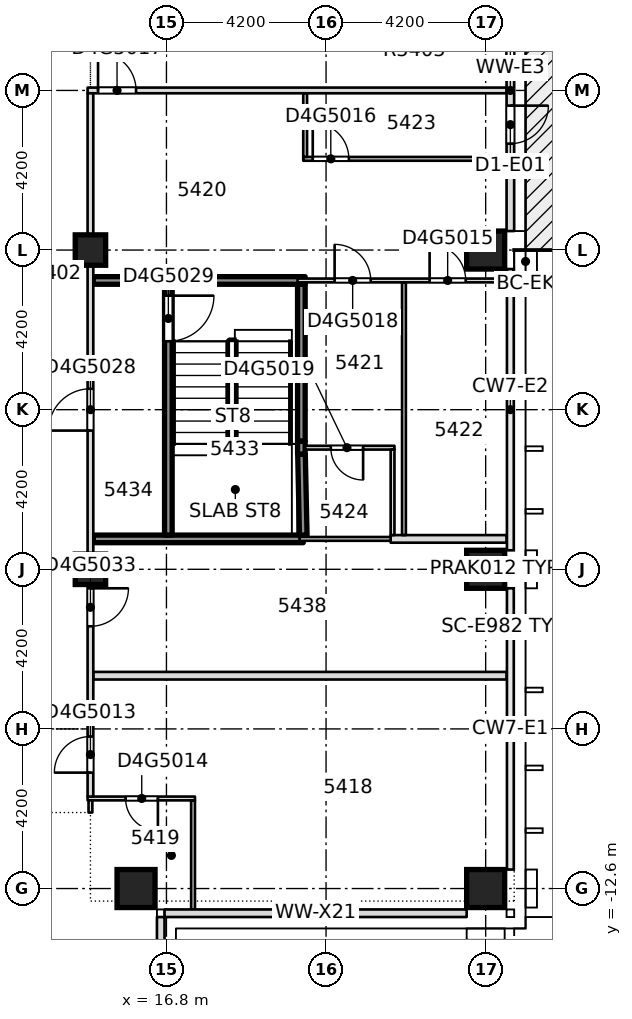
"""IFC4 building model, lengths in metres.
Left out: names, types, materials, properties, quantities, classifications, styles, units other than length and angle.
Written with IfcOpenShell. Run it as: python <this file> out.ifc"""

import sys

from ifc_helpers import new_model, si_unit, direction, frame, frame_2d, origin, origin_2d, place, context, subcontext, project, spatial, rectangle, extrude, element, fill, save


model = new_model("IFC4")
c1 = context("Model", 3, precision=1e-05, world=origin(), true_north=direction((0.0, 1.0)))
c2 = subcontext(c1, "Body", "Model", "MODEL_VIEW")
j1 = project(units=[si_unit("LENGTHUNIT", "METRE"), si_unit("PLANEANGLEUNIT", "RADIAN")], contexts=[c1])
p1 = place(None, origin())
s1 = spatial("IfcSite", under=j1, at=p1, CompositionType="ELEMENT")
p2 = place(p1, origin())
s2 = spatial("IfcBuilding", under=s1, at=p2, CompositionType="ELEMENT")
p3 = place(p2, frame((0.0, 0.0, 206.6)))
s3 = spatial("IfcBuildingStorey", under=s2, at=p3, CompositionType="ELEMENT", Elevation=206.6)
for number, where, z_axis, x_axis in (
    (1, (16.0, -12.6, -0.4), (0.0, 0.0, 1.0), (1.0, 0.0, 0.0)),
    (2, (25.2, -12.6, -0.4), (0.0, 0.0, 1.0), (1.0, 0.0, 0.0)),
    (3, (25.2, -4.2, -0.4), (0.0, 0.0, 1.0), (1.0, 0.0, 0.0)),
    (4, (25.2, 4.2, -0.4), (0.0, 0.0, 1.0), (1.0, 0.0, 0.0)),
):
    element("IfcColumn", number, at=place(p3, frame(where, z_axis=z_axis, x_axis=x_axis)), inside=s3, PredefinedType="COLUMN", context=c2, shape_type="SweptSolid", body=[
        extrude(rectangle(XDim=1.0, YDim=1.0, at=origin_2d()), origin(), (0.0, 0.0, 1.0), 3.45),
    ])
for number, where, z_axis, x_axis in (
    (5, (14.8, -4.2, -0.4), (0.0, 0.0, 1.0), (1.0, 0.0, 0.0)),
    (6, (14.8, 4.2, -0.4), (0.0, 0.0, 1.0), (1.0, 0.0, 0.0)),
):
    element("IfcColumn", number, at=place(p3, frame(where, z_axis=z_axis, x_axis=x_axis)), inside=s3, PredefinedType="COLUMN", context=c2, shape_type="SweptSolid", body=[
        extrude(rectangle(XDim=0.8, YDim=0.8, at=origin_2d()), origin(), (0.0, 0.0, 1.0), 3.45),
    ])
p4 = place(p3, frame((14.725, -10.23, 0.0), z_axis=(0.0, 0.0, 1.0), x_axis=(1.0, 0.0, 0.0)))
e7 = element("IfcWall", 7, at=p4, inside=s3, PredefinedType="PARTITIONING", context=c2, shape_type="SweptSolid", body=[
    extrude(rectangle(XDim=2.825, YDim=0.1, at=frame_2d((1.413, 0.0))), origin(), (0.0, 0.0, 1.0), 3.05),
])
p5 = place(p4, frame((1.0, 0.0, 0.0)))
e8 = element("IfcOpeningElement", 8, at=p5, cuts=e7, PredefinedType="OPENING", context=c2, shape_type="SweptSolid", body=[
    extrude(rectangle(XDim=0.85, YDim=2.1, at=frame_2d((0.425, 1.05))), frame((0.0, 0.06, 0.0), z_axis=(0.0, -1.0, 0.0), x_axis=(1.0, 0.0, 0.0)), (0.0, 0.0, 1.0), 0.12),
])
p6 = place(p3, frame((14.875, -7.0, 0.0), z_axis=(0.0, 0.0, 1.0), x_axis=(1.0, 0.0, 0.0)))
e9 = element("IfcWall", 9, at=p6, inside=s3, PredefinedType="PARTITIONING", context=c2, shape_type="SweptSolid", body=[
    extrude(rectangle(XDim=10.875, YDim=0.2, at=frame_2d((5.438, 0.0))), origin(), (0.0, 0.0, 1.0), 3.05),
])
p7 = place(p3, frame((14.875, -3.4, 0.0), z_axis=(0.0, 0.0, 1.0), x_axis=(1.0, 0.0, 0.0)))
e10 = element("IfcWall", 10, at=p7, inside=s3, PredefinedType="SOLIDWALL", context=c2, shape_type="SweptSolid", body=[
    extrude(rectangle(XDim=5.525, YDim=0.2, at=frame_2d((2.762, 0.0))), origin(), (0.0, 0.0, 1.0), 3.05),
])
p8 = place(p3, frame((20.3, -3.4, 0.0), z_axis=(0.0, 0.0, 1.0), x_axis=(1.0, 0.0, 0.0)))
e11 = element("IfcWall", 11, at=p8, inside=s3, PredefinedType="PARTITIONING", context=c2, shape_type="SweptSolid", body=[
    extrude(rectangle(XDim=2.5, YDim=0.1, at=frame_2d((1.25, 0.0))), origin(), (0.0, 0.0, 1.0), 3.05),
])
p9 = place(p3, frame((22.7, -3.4, 0.0), z_axis=(0.0, 0.0, 1.0), x_axis=(1.0, 0.0, 0.0)))
e12 = element("IfcWall", 12, at=p9, inside=s3, PredefinedType="PARTITIONING", context=c2, shape_type="SweptSolid", body=[
    extrude(rectangle(XDim=3.05, YDim=0.2, at=frame_2d((1.525, 0.0))), origin(), (0.0, 0.0, 1.0), 3.05),
])
p10 = place(p3, frame((20.45, -1.0, 0.0), z_axis=(0.0, 0.0, 1.0), x_axis=(1.0, 0.0, 0.0)))
e13 = element("IfcWall", 13, at=p10, inside=s3, PredefinedType="PARTITIONING", context=c2, shape_type="SweptSolid", body=[
    extrude(rectangle(XDim=2.35, YDim=0.1, at=frame_2d((1.175, 0.0))), origin(), (0.0, 0.0, 1.0), 3.05),
])
p11 = place(p10, frame((0.675, 0.0, 0.0)))
e14 = element("IfcOpeningElement", 14, at=p11, cuts=e13, PredefinedType="OPENING", context=c2, shape_type="SweptSolid", body=[
    extrude(rectangle(XDim=0.85, YDim=2.1, at=frame_2d((0.425, 1.05))), frame((0.0, 0.06, 0.0), z_axis=(0.0, -1.0, 0.0), x_axis=(1.0, 0.0, 0.0)), (0.0, 0.0, 1.0), 0.12),
])
p12 = place(p3, frame((20.25, 3.4, 0.0), z_axis=(0.0, 0.0, 1.0), x_axis=(1.0, 0.0, 0.0)))
e15 = element("IfcWall", 15, at=p12, inside=s3, PredefinedType="PARTITIONING", context=c2, shape_type="SweptSolid", body=[
    extrude(rectangle(XDim=5.5, YDim=0.1, at=frame_2d((2.75, 0.0))), origin(), (0.0, 0.0, 1.0), 3.05),
])
p13 = place(p12, frame((3.475, 0.0, 0.0)))
e16 = element("IfcOpeningElement", 16, at=p13, cuts=e15, PredefinedType="OPENING", context=c2, shape_type="SweptSolid", body=[
    extrude(rectangle(XDim=0.95, YDim=2.1, at=frame_2d((0.475, 1.05))), frame((0.0, 0.06, 0.0), z_axis=(0.0, -1.0, 0.0), x_axis=(1.0, 0.0, 0.0)), (0.0, 0.0, 1.0), 0.12),
])
p14 = place(p12, frame((0.975, 0.0, 0.0)))
e17 = element("IfcOpeningElement", 17, at=p14, cuts=e15, PredefinedType="OPENING", context=c2, shape_type="SweptSolid", body=[
    extrude(rectangle(XDim=0.95, YDim=2.1, at=frame_2d((0.475, 1.05))), frame((0.0, 0.06, 0.0), z_axis=(0.0, -1.0, 0.0), x_axis=(1.0, 0.0, 0.0)), (0.0, 0.0, 1.0), 0.12),
])
p15 = place(p3, frame((20.4, 6.6, 0.0), z_axis=(0.0, 0.0, 1.0), x_axis=(1.0, 0.0, 0.0)))
e18 = element("IfcWall", 18, at=p15, inside=s3, PredefinedType="PARTITIONING", context=c2, shape_type="SweptSolid", body=[
    extrude(rectangle(XDim=5.35, YDim=0.1, at=frame_2d((2.675, 0.0))), origin(), (0.0, 0.0, 1.0), 3.05),
])
p16 = place(p15, frame((0.25, 0.0, 0.0)))
e19 = element("IfcOpeningElement", 19, at=p16, cuts=e18, PredefinedType="OPENING", context=c2, shape_type="SweptSolid", body=[
    extrude(rectangle(XDim=0.95, YDim=2.1, at=frame_2d((0.475, 1.05))), frame((0.0, 0.06, 0.0), z_axis=(0.0, -1.0, 0.0), x_axis=(1.0, 0.0, 0.0)), (0.0, 0.0, 1.0), 0.12),
])
p17 = place(p3, frame((14.725, 8.4, 0.0), z_axis=(0.0, 0.0, 1.0), x_axis=(1.0, 0.0, 0.0)))
e20 = element("IfcWall", 20, at=p17, inside=s3, PredefinedType="PARTITIONING", context=c2, shape_type="SweptSolid", body=[
    extrude(rectangle(XDim=11.025, YDim=0.15, at=frame_2d((5.512, 0.0))), origin(), (0.0, 0.0, 1.0), 3.05),
])
p18 = place(p17, frame((0.275, 0.0, 0.0)))
e21 = element("IfcOpeningElement", 21, at=p18, cuts=e20, PredefinedType="OPENING", context=c2, shape_type="SweptSolid", body=[
    extrude(rectangle(XDim=1.0, YDim=2.1, at=frame_2d((0.5, 1.05))), frame((0.0, 0.085, 0.0), z_axis=(0.0, -1.0, 0.0), x_axis=(1.0, 0.0, 0.0)), (0.0, 0.0, 1.0), 0.17),
])
p19 = place(p3, frame((14.8, -10.6, 0.0), z_axis=(0.0, 0.0, 1.0), x_axis=(0.0, 1.0, 0.0)))
e22 = element("IfcWall", 22, at=p19, inside=s3, PredefinedType="PARTITIONING", context=c2, shape_type="SweptSolid", body=[
    extrude(rectangle(XDim=0.32, YDim=0.1, at=frame_2d((0.16, 0.0))), origin(), (0.0, 0.0, 1.0), 3.05),
])
p20 = place(p3, frame((14.8, -10.18, 0.0), z_axis=(0.0, 0.0, 1.0), x_axis=(0.0, 1.0, 0.0)))
e23 = element("IfcWall", 23, at=p20, inside=s3, PredefinedType="PARTITIONING", context=c2, shape_type="SweptSolid", body=[
    extrude(rectangle(XDim=18.505, YDim=0.15, at=frame_2d((9.252, 0.0))), origin(), (0.0, 0.0, 1.0), 3.05),
])
p21 = place(p20, frame((0.63, 0.0, 0.0)))
e24 = element("IfcOpeningElement", 24, at=p21, cuts=e23, PredefinedType="OPENING", context=c2, shape_type="SweptSolid", body=[
    extrude(rectangle(XDim=0.95, YDim=2.1, at=frame_2d((0.475, 1.05))), frame((0.0, 0.085, 0.0), z_axis=(0.0, -1.0, 0.0), x_axis=(1.0, 0.0, 0.0)), (0.0, 0.0, 1.0), 0.17),
])
p22 = place(p20, frame((9.63, 0.0, 0.0)))
e25 = element("IfcOpeningElement", 25, at=p22, cuts=e23, PredefinedType="OPENING", context=c2, shape_type="SweptSolid", body=[
    extrude(rectangle(XDim=1.1, YDim=2.1, at=frame_2d((0.55, 1.05))), frame((0.0, 0.085, 0.0), z_axis=(0.0, -1.0, 0.0), x_axis=(1.0, 0.0, 0.0)), (0.0, 0.0, 1.0), 0.17),
])
p23 = place(p20, frame((4.48, 0.0, 0.0)))
e26 = element("IfcOpeningElement", 26, at=p23, cuts=e23, PredefinedType="OPENING", context=c2, shape_type="SweptSolid", body=[
    extrude(rectangle(XDim=1.0, YDim=2.1, at=frame_2d((0.5, 1.05))), frame((0.0, 0.085, 0.0), z_axis=(0.0, -1.0, 0.0), x_axis=(1.0, 0.0, 0.0)), (0.0, 0.0, 1.0), 0.17),
])
p24 = place(p3, frame((16.85, -3.3, 0.0), z_axis=(0.0, 0.0, 1.0), x_axis=(0.0, 1.0, 0.0)))
e27 = element("IfcWall", 27, at=p24, inside=s3, PredefinedType="SOLIDWALL", context=c2, shape_type="SweptSolid", body=[
    extrude(rectangle(XDim=6.6, YDim=0.2, at=frame_2d((3.3, 0.0))), origin(), (0.0, 0.0, 1.0), 3.05),
])
p25 = place(p24, frame((5.1, 0.0, 0.0)))
e28 = element("IfcOpeningElement", 28, at=p25, cuts=e27, PredefinedType="OPENING", context=c2, shape_type="SweptSolid", body=[
    extrude(rectangle(XDim=1.2, YDim=2.1, at=frame_2d((0.6, 1.05))), frame((0.0, 0.11, 0.0), z_axis=(0.0, -1.0, 0.0), x_axis=(1.0, 0.0, 0.0)), (0.0, 0.0, 1.0), 0.22),
])
p26 = place(p3, frame((17.5, -13.15, 0.0), z_axis=(0.0, 0.0, 1.0), x_axis=(0.0, 1.0, 0.0)))
e29 = element("IfcWall", 29, at=p26, inside=s3, PredefinedType="PARTITIONING", context=c2, shape_type="SweptSolid", body=[
    extrude(rectangle(XDim=2.87, YDim=0.1, at=frame_2d((1.435, 0.0))), origin(), (0.0, 0.0, 1.0), 3.05),
])
p27 = place(p3, frame((20.4, -3.3, 0.0), z_axis=(0.0, 0.0, 1.0), x_axis=(-0.021771342749, 0.999762976227, 0.0)))
e30 = element("IfcWall", 30, at=p27, inside=s3, PredefinedType="SOLIDWALL", context=c2, shape_type="SweptSolid", body=[
    extrude(rectangle(XDim=2.131, YDim=0.2, at=frame_2d((1.065, 0.0))), origin(), (0.0, 0.0, 1.0), 3.05),
])
p28 = place(p3, frame((20.35, -0.83, 0.0), z_axis=(0.0, 0.0, 1.0), x_axis=(0.0, 1.0, 0.0)))
e31 = element("IfcWall", 31, at=p28, inside=s3, PredefinedType="SOLIDWALL", context=c2, shape_type="SweptSolid", body=[
    extrude(rectangle(XDim=4.13, YDim=0.2, at=frame_2d((2.065, 0.0))), origin(), (0.0, 0.0, 1.0), 3.05),
])
p29 = place(p3, frame((20.45, 6.65, 0.0), z_axis=(0.0, 0.0, 1.0), x_axis=(0.0, 1.0, 0.0)))
e32 = element("IfcWall", 32, at=p29, inside=s3, PredefinedType="PARTITIONING", context=c2, shape_type="SweptSolid", body=[
    extrude(rectangle(XDim=1.675, YDim=0.1, at=frame_2d((0.837, 0.0))), origin(), (0.0, 0.0, 1.0), 3.05),
])
p30 = place(p3, frame((22.75, -3.3, 0.0), z_axis=(0.0, 0.0, 1.0), x_axis=(0.0, 1.0, 0.0)))
e33 = element("IfcWall", 33, at=p30, inside=s3, PredefinedType="PARTITIONING", context=c2, shape_type="SweptSolid", body=[
    extrude(rectangle(XDim=2.25, YDim=0.1, at=frame_2d((1.125, 0.0))), origin(), (0.0, 0.0, 1.0), 3.05),
])
p31 = place(p3, frame((23.05, -3.3, 0.0), z_axis=(0.0, 0.0, 1.0), x_axis=(0.0, 1.0, 0.0)))
e34 = element("IfcWall", 34, at=p31, inside=s3, PredefinedType="PARTITIONING", context=c2, shape_type="SweptSolid", body=[
    extrude(rectangle(XDim=6.65, YDim=0.1, at=frame_2d((3.325, 0.0))), origin(), (0.0, 0.0, 1.0), 3.05),
])
p32 = place(p3, frame((16.65, -20.5, 0.0), z_axis=(0.0, 0.0, 1.0), x_axis=(0.0, 1.0, 0.0)))
e35 = element("IfcWall", 35, at=p32, inside=s3, PredefinedType="STANDARD", context=c2, shape_type="SweptSolid", body=[
    extrude(rectangle(XDim=7.15, YDim=0.2, at=frame_2d((3.575, 0.0))), origin(), (0.0, 0.0, 1.0), 3.05),
])
p33 = place(p32, frame((0.4, 0.0, 0.2)))
e36 = element("IfcOpeningElement", 36, at=p33, cuts=e35, PredefinedType="OPENING", context=c2, shape_type="SweptSolid", body=[
    extrude(rectangle(XDim=1.8, YDim=2.65, at=frame_2d((0.9, 1.325))), frame((0.0, 0.11, 0.0), z_axis=(0.0, -1.0, 0.0), x_axis=(1.0, 0.0, 0.0)), (0.0, 0.0, 1.0), 0.22),
])
p34 = place(p32, frame((3.975, 0.0, 0.2)))
e37 = element("IfcOpeningElement", 37, at=p34, cuts=e35, PredefinedType="OPENING", context=c2, shape_type="SweptSolid", body=[
    extrude(rectangle(XDim=1.8, YDim=2.65, at=frame_2d((0.9, 1.325))), frame((0.0, 0.11, 0.0), z_axis=(0.0, -1.0, 0.0), x_axis=(1.0, 0.0, 0.0)), (0.0, 0.0, 1.0), 0.22),
])
p35 = place(p3, frame((16.75, -13.25, 0.0), z_axis=(0.0, 0.0, 1.0), x_axis=(1.0, 0.0, 0.0)))
e38 = element("IfcWall", 38, at=p35, inside=s3, PredefinedType="STANDARD", context=c2, shape_type="SweptSolid", body=[
    extrude(rectangle(XDim=7.95, YDim=0.2, at=frame_2d((3.975, 0.0))), origin(), (0.0, 0.0, 1.0), 3.05),
])
p36 = place(p3, frame((25.85, 4.7, 0.0), z_axis=(0.0, 0.0, 1.0), x_axis=(0.0, 1.0, 0.0)))
e39 = element("IfcWall", 39, at=p36, inside=s3, PredefinedType="STANDARD", context=c2, shape_type="SweptSolid", body=[
    extrude(rectangle(XDim=7.4, YDim=0.2, at=frame_2d((3.7, 0.0))), origin(), (0.0, 0.0, 1.0), 3.05),
])
p37 = place(p36, frame((2.3, 0.0, 0.0)))
e40 = element("IfcOpeningElement", 40, at=p37, cuts=e39, PredefinedType="OPENING", context=c2, shape_type="SweptSolid", body=[
    extrude(rectangle(XDim=1.0, YDim=2.4, at=frame_2d((0.5, 1.2))), frame((0.0, 0.11, 0.0), z_axis=(0.0, -1.0, 0.0), x_axis=(1.0, 0.0, 0.0)), (0.0, 0.0, 1.0), 0.22),
])
p38 = place(p36, frame((4.1, 0.0, 0.2)))
e41 = element("IfcOpeningElement", 41, at=p38, cuts=e39, PredefinedType="OPENING", context=c2, shape_type="SweptSolid", body=[
    extrude(rectangle(XDim=1.8, YDim=2.65, at=frame_2d((0.9, 1.325))), frame((0.0, 0.11, 0.0), z_axis=(0.0, -1.0, 0.0), x_axis=(1.0, 0.0, 0.0)), (0.0, 0.0, 1.0), 0.22),
])
p39 = place(p36, frame((6.0, 0.0, 0.0)))
e42 = element("IfcOpeningElement", 42, at=p39, cuts=e39, PredefinedType="OPENING", context=c2, shape_type="SweptSolid", body=[
    extrude(rectangle(XDim=1.0, YDim=2.4, at=frame_2d((0.5, 1.2))), frame((0.0, 0.11, 0.0), z_axis=(0.0, -1.0, 0.0), x_axis=(1.0, 0.0, 0.0)), (0.0, 0.0, 1.0), 0.22),
])
p40 = place(p3, frame((20.35, -1.17, 0.0), z_axis=(0.0, 0.0, 1.0), x_axis=(0.0, 1.0, 0.0)))
e43 = element("IfcWall", 43, at=p40, inside=s3, PredefinedType="SOLIDWALL", context=c2, shape_type="SweptSolid", body=[
    extrude(rectangle(XDim=0.34, YDim=0.2, at=frame_2d((0.17, 0.0))), origin(), (0.0, 0.0, 1.0), 3.05),
])
p41 = place(p3, frame((14.875, 3.4, 0.0), z_axis=(0.0, 0.0, 1.0), x_axis=(1.0, 0.0, 0.0)))
e44 = element("IfcWall", 44, at=p41, inside=s3, PredefinedType="SOLIDWALL", context=c2, shape_type="SweptSolid", body=[
    extrude(rectangle(XDim=5.575, YDim=0.2, at=frame_2d((2.788, 0.0))), origin(), (0.0, 0.0, 1.0), 3.05),
])
p42 = place(p21, origin())
e45 = element("IfcDoor", 45, at=p42, inside=s3, OperationType="SINGLE_SWING_RIGHT", PredefinedType="DOOR", context=c2, shape_type="SweptSolid", body=[
    extrude(rectangle(XDim=0.95, YDim=2.1, at=frame_2d((0.475, 1.05))), frame((0.0, 0.025, 0.0), z_axis=(0.0, -1.0, 0.0), x_axis=(1.0, 0.0, 0.0)), (0.0, 0.0, 1.0), 0.05),
])
fill(e24, e45)
p43 = place(p5, origin())
e46 = element("IfcDoor", 46, at=p43, inside=s3, OperationType="SINGLE_SWING_RIGHT", PredefinedType="DOOR", context=c2, shape_type="SweptSolid", body=[
    extrude(rectangle(XDim=0.85, YDim=2.1, at=frame_2d((0.425, 1.05))), frame((0.0, 0.025, 0.0), z_axis=(0.0, -1.0, 0.0), x_axis=(1.0, 0.0, 0.0)), (0.0, 0.0, 1.0), 0.05),
])
fill(e8, e46)
p44 = place(p13, origin())
e47 = element("IfcDoor", 47, at=p44, inside=s3, OperationType="SINGLE_SWING_RIGHT", PredefinedType="DOOR", context=c2, shape_type="SweptSolid", body=[
    extrude(rectangle(XDim=0.95, YDim=2.1, at=frame_2d((0.475, 1.05))), frame((0.0, 0.025, 0.0), z_axis=(0.0, -1.0, 0.0), x_axis=(1.0, 0.0, 0.0)), (0.0, 0.0, 1.0), 0.05),
])
fill(e16, e47)
p45 = place(p16, origin())
e48 = element("IfcDoor", 48, at=p45, inside=s3, OperationType="SINGLE_SWING_LEFT", PredefinedType="DOOR", context=c2, shape_type="SweptSolid", body=[
    extrude(rectangle(XDim=0.95, YDim=2.1, at=frame_2d((0.475, 1.05))), frame((0.0, 0.025, 0.0), z_axis=(0.0, -1.0, 0.0), x_axis=(1.0, 0.0, 0.0)), (0.0, 0.0, 1.0), 0.05),
])
fill(e19, e48)
p46 = place(p18, origin())
e49 = element("IfcDoor", 49, at=p46, inside=s3, OperationType="SINGLE_SWING_RIGHT", PredefinedType="DOOR", context=c2, shape_type="SweptSolid", body=[
    extrude(rectangle(XDim=1.0, YDim=2.1, at=frame_2d((0.5, 1.05))), frame((0.0, 0.025, 0.0), z_axis=(0.0, -1.0, 0.0), x_axis=(1.0, 0.0, 0.0)), (0.0, 0.0, 1.0), 0.05),
])
fill(e21, e49)
p47 = place(p14, origin())
e50 = element("IfcDoor", 50, at=p47, inside=s3, OperationType="SINGLE_SWING_RIGHT", PredefinedType="DOOR", context=c2, shape_type="SweptSolid", body=[
    extrude(rectangle(XDim=0.95, YDim=2.1, at=frame_2d((0.475, 1.05))), frame((0.0, 0.025, 0.0), z_axis=(0.0, -1.0, 0.0), x_axis=(1.0, 0.0, 0.0)), (0.0, 0.0, 1.0), 0.05),
])
fill(e17, e50)
p48 = place(p11, origin())
e51 = element("IfcDoor", 51, at=p48, inside=s3, OperationType="SINGLE_SWING_RIGHT", PredefinedType="DOOR", context=c2, shape_type="SweptSolid", body=[
    extrude(rectangle(XDim=0.85, YDim=2.1, at=frame_2d((0.425, 1.05))), frame((0.0, 0.025, 0.0), z_axis=(0.0, -1.0, 0.0), x_axis=(1.0, 0.0, 0.0)), (0.0, 0.0, 1.0), 0.05),
])
fill(e14, e51)
p49 = place(p22, origin())
e52 = element("IfcDoor", 52, at=p49, inside=s3, OperationType="SINGLE_SWING_LEFT", PredefinedType="DOOR", context=c2, shape_type="SweptSolid", body=[
    extrude(rectangle(XDim=1.1, YDim=2.1, at=frame_2d((0.55, 1.05))), frame((0.0, 0.025, 0.0), z_axis=(0.0, -1.0, 0.0), x_axis=(1.0, 0.0, 0.0)), (0.0, 0.0, 1.0), 0.05),
])
fill(e25, e52)
p50 = place(p25, origin())
e53 = element("IfcDoor", 53, at=p50, inside=s3, OperationType="SINGLE_SWING_LEFT", PredefinedType="DOOR", context=c2, shape_type="SweptSolid", body=[
    extrude(rectangle(XDim=1.2, YDim=2.1, at=frame_2d((0.6, 1.05))), frame((0.0, 0.025, 0.0), z_axis=(0.0, -1.0, 0.0), x_axis=(1.0, 0.0, 0.0)), (0.0, 0.0, 1.0), 0.05),
])
fill(e28, e53)
p51 = place(p23, origin())
e54 = element("IfcDoor", 54, at=p51, inside=s3, OperationType="SINGLE_SWING_RIGHT", PredefinedType="DOOR", context=c2, shape_type="SweptSolid", body=[
    extrude(rectangle(XDim=1.0, YDim=2.1, at=frame_2d((0.5, 1.05))), frame((0.0, 0.025, 0.0), z_axis=(0.0, -1.0, 0.0), x_axis=(1.0, 0.0, 0.0)), (0.0, 0.0, 1.0), 0.05),
])
fill(e26, e54)
p52 = place(p37, origin())
e55 = element("IfcDoor", 55, at=p52, inside=s3, OperationType="SINGLE_SWING_LEFT", PredefinedType="DOOR", context=c2, shape_type="SweptSolid", body=[
    extrude(rectangle(XDim=1.0, YDim=2.4, at=frame_2d((0.5, 1.2))), frame((0.0, 0.025, 0.0), z_axis=(0.0, -1.0, 0.0), x_axis=(1.0, 0.0, 0.0)), (0.0, 0.0, 1.0), 0.05),
])
fill(e40, e55)
p53 = place(p38, origin())
e56 = element("IfcWindow", 56, at=p53, inside=s3, PartitioningType="SINGLE_PANEL", PredefinedType="WINDOW", context=c2, shape_type="SweptSolid", body=[
    extrude(rectangle(XDim=1.8, YDim=2.65, at=frame_2d((0.9, 1.325))), frame((0.0, 0.03, 0.0), z_axis=(0.0, -1.0, 0.0), x_axis=(1.0, 0.0, 0.0)), (0.0, 0.0, 1.0), 0.06),
])
fill(e41, e56)
save(model, sys.argv[1])
